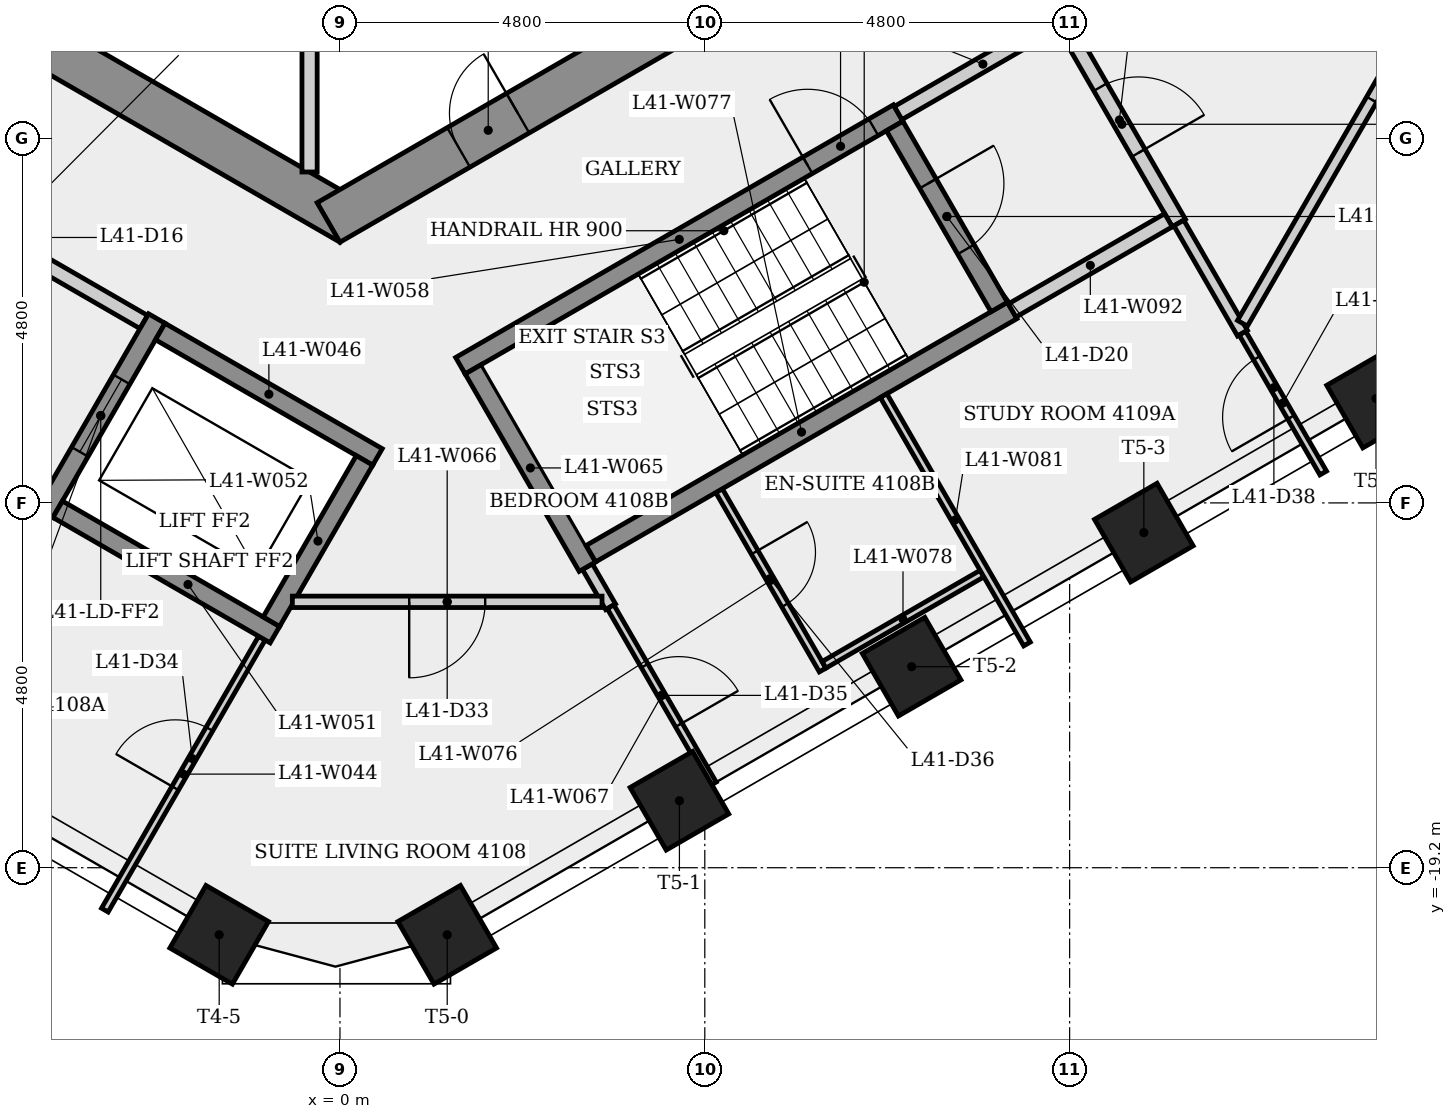
"""IFC4 building model, lengths in metres.
Left out: names, types, materials, properties, quantities, classifications, styles, units other than length and angle.
Written with IfcOpenShell. Run it as: python <this file> out.ifc"""

import sys

from ifc_helpers import new_model, si_unit, direction, frame, frame_2d, origin, origin_2d, place, context, subcontext, project, spatial, rectangle, extrude, element, fill, save


model = new_model("IFC4")
c1 = context("Model", 3, precision=1e-05, world=origin(), true_north=direction((0.0, 1.0)))
c2 = subcontext(c1, "Body", "Model", "MODEL_VIEW")
j1 = project(units=[si_unit("LENGTHUNIT", "METRE"), si_unit("PLANEANGLEUNIT", "RADIAN")], contexts=[c1])
p1 = place(None, origin())
s1 = spatial("IfcSite", under=j1, at=p1, CompositionType="ELEMENT")
p2 = place(p1, origin())
s2 = spatial("IfcBuilding", under=s1, at=p2, CompositionType="ELEMENT")
p3 = place(p2, frame((0.0, 0.0, 156.1)))
s3 = spatial("IfcBuildingStorey", under=s2, at=p3, CompositionType="ELEMENT", Elevation=156.1)
p4 = place(p3, frame((-9.35, -5.225, 0.0), z_axis=(0.0, 0.0, 1.0), x_axis=(0.866023993627, -0.500002442456, 0.0)))
e1 = element("IfcWall", 1, at=p4, inside=s3, PredefinedType="SHEAR", context=c2, shape_type="SweptSolid", body=[
    extrude(rectangle(XDim=10.97, YDim=0.6, at=frame_2d((5.485, 0.0))), origin(), (0.0, 0.0, 1.0), 3.4),
])
p5 = place(p4, frame((4.816, 0.0, 0.0)))
e2 = element("IfcOpeningElement", 2, at=p5, cuts=e1, PredefinedType="OPENING", context=c2, shape_type="SweptSolid", body=[
    extrude(rectangle(XDim=0.9, YDim=2.1, at=frame_2d((0.45, 1.05))), frame((0.0, 0.31, 0.0), z_axis=(0.0, -1.0, 0.0), x_axis=(1.0, 0.0, 0.0)), (0.0, 0.0, 1.0), 0.62),
])
p6 = place(p3, frame((-0.15, -10.71, 0.0), z_axis=(0.0, 0.0, 1.0), x_axis=(0.866023993627, 0.500002442456, 0.0)))
e3 = element("IfcWall", 3, at=p6, inside=s3, PredefinedType="SHEAR", context=c2, shape_type="SweptSolid", body=[
    extrude(rectangle(XDim=10.97, YDim=0.6, at=frame_2d((5.485, 0.0))), origin(), (0.0, 0.0, 1.0), 3.4),
])
p7 = place(p6, frame((1.975, 0.0, 0.0)))
e4 = element("IfcOpeningElement", 4, at=p7, cuts=e3, PredefinedType="OPENING", context=c2, shape_type="SweptSolid", body=[
    extrude(rectangle(XDim=0.9, YDim=2.1, at=frame_2d((0.45, 1.05))), frame((0.0, 0.31, 0.0), z_axis=(0.0, -1.0, 0.0), x_axis=(1.0, 0.0, 0.0)), (0.0, 0.0, 1.0), 0.62),
])
p8 = place(p6, frame((8.782, 0.0, 0.0)))
e5 = element("IfcOpeningElement", 5, at=p8, cuts=e3, PredefinedType="OPENING", context=c2, shape_type="SweptSolid", body=[
    extrude(rectangle(XDim=0.9, YDim=2.1, at=frame_2d((0.45, 1.05))), frame((0.0, 0.31, 0.0), z_axis=(0.0, -1.0, 0.0), x_axis=(1.0, 0.0, 0.0)), (0.0, 0.0, 1.0), 0.62),
])
for number, where, z_axis, x_axis in (
    (6, (-1.589, -20.083, 0.0), (0.0, 0.0, 1.0), (-0.5, -0.866, 0.0)),
    (7, (1.411, -20.083, 0.0), (0.0, 0.0, 1.0), (0.5, -0.866, 0.0)),
    (8, (4.466, -18.319, 0.0), (0.0, 0.0, 1.0), (0.5, -0.866, 0.0)),
    (9, (7.521, -16.555, 0.0), (0.0, 0.0, 1.0), (0.5, -0.866, 0.0)),
    (10, (10.576, -14.791, 0.0), (0.0, 0.0, 1.0), (0.5, -0.866, 0.0)),
    (11, (13.631, -13.027, 0.0), (0.0, 0.0, 1.0), (0.5, -0.866, 0.0)),
):
    element("IfcColumn", number, at=place(p3, frame(where, z_axis=z_axis, x_axis=x_axis)), inside=s3, PredefinedType="COLUMN", context=c2, shape_type="SweptSolid", body=[
        extrude(rectangle(XDim=0.95, YDim=0.95, at=origin_2d()), origin(), (0.0, 0.0, 1.0), 3.4),
    ])
p9 = place(p3, frame((-6.435, -9.795, 0.0), z_axis=(0.0, 0.0, 1.0), x_axis=(0.866012907634, -0.500021643343, 0.0)))
e12 = element("IfcWall", 12, at=p9, inside=s3, PredefinedType="PARTITIONING", context=c2, shape_type="SweptSolid", body=[
    extrude(rectangle(XDim=4.45, YDim=0.2, at=frame_2d((2.225, 0.0))), origin(), (0.0, 0.0, 1.0), 3.05),
])
p10 = place(p9, frame((1.675, 0.0, 0.0)))
e13 = element("IfcOpeningElement", 13, at=p10, cuts=e12, PredefinedType="OPENING", context=c2, shape_type="SweptSolid", body=[
    extrude(rectangle(XDim=1.1, YDim=2.1, at=frame_2d((0.55, 1.05))), frame((0.0, 0.11, 0.0), z_axis=(0.0, -1.0, 0.0), x_axis=(1.0, 0.0, 0.0)), (0.0, 0.0, 1.0), 0.22),
])
p11 = place(p3, frame((-3.094, -19.758, 0.0), z_axis=(0.0, 0.0, 1.0), x_axis=(0.500027577057, 0.866009481578, 0.0)))
e14 = element("IfcWall", 14, at=p11, inside=s3, PredefinedType="PARTITIONING", context=c2, shape_type="SweptSolid", body=[
    extrude(rectangle(XDim=4.133, YDim=0.1, at=frame_2d((2.066, 0.0))), origin(), (0.0, 0.0, 1.0), 3.05),
])
p12 = place(p11, frame((1.852, 0.0, 0.0)))
e15 = element("IfcOpeningElement", 15, at=p12, cuts=e14, PredefinedType="OPENING", context=c2, shape_type="SweptSolid", body=[
    extrude(rectangle(XDim=0.9, YDim=2.1, at=frame_2d((0.45, 1.05))), frame((0.0, 0.06, 0.0), z_axis=(0.0, -1.0, 0.0), x_axis=(1.0, 0.0, 0.0)), (0.0, 0.0, 1.0), 0.12),
])
p13 = place(p3, frame((-2.41, -11.974, 0.0), z_axis=(0.0, 0.0, 1.0), x_axis=(-0.500001826776, -0.866024349092, 0.0)))
e16 = element("IfcWall", 16, at=p13, inside=s3, PredefinedType="SHEAR", context=c2, shape_type="SweptSolid", body=[
    extrude(rectangle(XDim=2.95, YDim=0.25, at=frame_2d((1.475, 0.0))), origin(), (0.0, 0.0, 1.0), 3.05),
])
p14 = place(p13, frame((0.925, 0.0, 0.0)))
e17 = element("IfcOpeningElement", 17, at=p14, cuts=e16, PredefinedType="OPENING", context=c2, shape_type="SweptSolid", body=[
    extrude(rectangle(XDim=1.1, YDim=2.1, at=frame_2d((0.55, 1.05))), frame((0.0, 0.135, 0.0), z_axis=(0.0, -1.0, 0.0), x_axis=(1.0, 0.0, 0.0)), (0.0, 0.0, 1.0), 0.27),
])
p15 = place(p3, frame((-2.364, -12.145, 0.0), z_axis=(0.0, 0.0, 1.0), x_axis=(0.866040211805, -0.499974350878, 0.0)))
e18 = element("IfcWall", 18, at=p15, inside=s3, PredefinedType="SHEAR", context=c2, shape_type="SweptSolid", body=[
    extrude(rectangle(XDim=3.3, YDim=0.25, at=frame_2d((1.65, 0.0))), origin(), (0.0, 0.0, 1.0), 3.05),
])
p16 = place(p3, frame((-0.856, -16.133, 0.0), z_axis=(0.0, 0.0, 1.0), x_axis=(-0.866021716278, 0.500006386895, 0.0)))
e19 = element("IfcWall", 19, at=p16, inside=s3, PredefinedType="SHEAR", context=c2, shape_type="SweptSolid", body=[
    extrude(rectangle(XDim=3.3, YDim=0.25, at=frame_2d((1.65, 0.0))), origin(), (0.0, 0.0, 1.0), 3.05),
])
p17 = place(p3, frame((-0.902, -15.962, 0.0), z_axis=(0.0, 0.0, 1.0), x_axis=(0.500061746146, 0.865989751695, 0.0)))
e20 = element("IfcWall", 20, at=p17, inside=s3, PredefinedType="SHEAR", context=c2, shape_type="SweptSolid", body=[
    extrude(rectangle(XDim=2.45, YDim=0.25, at=frame_2d((1.225, 0.0))), origin(), (0.0, 0.0, 1.0), 3.4),
])
p18 = place(p3, frame((-0.4, -5.25, 0.0), z_axis=(0.0, 0.0, 1.0), x_axis=(0.0, -1.0, 0.0)))
e21 = element("IfcWall", 21, at=p18, inside=s3, PredefinedType="PARTITIONING", context=c2, shape_type="SweptSolid", body=[
    extrude(rectangle(XDim=4.796, YDim=0.2, at=frame_2d((2.398, 0.0))), origin(), (0.0, 0.0, 1.0), 3.05),
])
p19 = place(p3, frame((1.585, -12.595, 0.0), z_axis=(0.0, 0.0, 1.0), x_axis=(0.866036417653, 0.499980922934, 0.0)))
e22 = element("IfcWall", 22, at=p19, inside=s3, PredefinedType="SHEAR", context=c2, shape_type="SweptSolid", body=[
    extrude(rectangle(XDim=6.65, YDim=0.25, at=frame_2d((3.325, 0.0))), origin(), (0.0, 0.0, 1.0), 3.05),
])
p20 = place(p19, frame((5.275, 0.0, 0.0)))
e23 = element("IfcOpeningElement", 23, at=p20, cuts=e22, PredefinedType="OPENING", context=c2, shape_type="SweptSolid", body=[
    extrude(rectangle(XDim=1.0, YDim=2.1, at=frame_2d((0.5, 1.05))), frame((0.0, 0.135, 0.0), z_axis=(0.0, -1.0, 0.0), x_axis=(1.0, 0.0, 0.0)), (0.0, 0.0, 1.0), 0.27),
])
p21 = place(p3, frame((3.256, -15.239, 0.0), z_axis=(0.0, 0.0, 1.0), x_axis=(0.499930512259, -0.866065518833, 0.0)))
e24 = element("IfcWall", 24, at=p21, inside=s3, PredefinedType="PARTITIONING", context=c2, shape_type="SweptSolid", body=[
    extrude(rectangle(XDim=0.609, YDim=0.15, at=frame_2d((0.305, 0.0))), origin(), (0.0, 0.0, 1.0), 3.05),
])
p22 = place(p3, frame((3.256, -15.239, 0.0), z_axis=(0.0, 0.0, 1.0), x_axis=(-0.50002537861, 0.866010750942, 0.0)))
e25 = element("IfcWall", 25, at=p22, inside=s3, PredefinedType="SHEAR", context=c2, shape_type="SweptSolid", body=[
    extrude(rectangle(XDim=3.0, YDim=0.25, at=frame_2d((1.5, 0.0))), origin(), (0.0, 0.0, 1.0), 3.05),
])
p23 = place(p3, frame((3.448, -15.702, 0.0), z_axis=(0.0, 0.0, 1.0), x_axis=(-1.0, 0.0, 0.0)))
e26 = element("IfcWall", 26, at=p23, inside=s3, PredefinedType="PARTITIONING", context=c2, shape_type="SweptSolid", body=[
    extrude(rectangle(XDim=4.074, YDim=0.15, at=frame_2d((2.037, 0.0))), origin(), (0.0, 0.0, 1.0), 3.05),
])
p24 = place(p23, frame((1.537, 0.0, 0.0)))
e27 = element("IfcOpeningElement", 27, at=p24, cuts=e26, PredefinedType="OPENING", context=c2, shape_type="SweptSolid", body=[
    extrude(rectangle(XDim=1.0, YDim=2.1, at=frame_2d((0.5, 1.05))), frame((0.0, 0.085, 0.0), z_axis=(0.0, -1.0, 0.0), x_axis=(1.0, 0.0, 0.0)), (0.0, 0.0, 1.0), 0.17),
])
p25 = place(p3, frame((3.56, -15.767, 0.0), z_axis=(0.0, 0.0, 1.0), x_axis=(0.500010215181, -0.866019505967, 0.0)))
e28 = element("IfcWall", 28, at=p25, inside=s3, PredefinedType="PARTITIONING", context=c2, shape_type="SweptSolid", body=[
    extrude(rectangle(XDim=2.693, YDim=0.1, at=frame_2d((1.346, 0.0))), origin(), (0.0, 0.0, 1.0), 3.05),
])
p26 = place(p25, frame((0.896, 0.0, 0.0)))
e29 = element("IfcOpeningElement", 29, at=p26, cuts=e28, PredefinedType="OPENING", context=c2, shape_type="SweptSolid", body=[
    extrude(rectangle(XDim=0.9, YDim=2.1, at=frame_2d((0.45, 1.05))), frame((0.0, 0.06, 0.0), z_axis=(0.0, -1.0, 0.0), x_axis=(1.0, 0.0, 0.0)), (0.0, 0.0, 1.0), 0.12),
])
p27 = place(p3, frame((4.988, -14.239, 0.0), z_axis=(0.0, 0.0, 1.0), x_axis=(0.500022328685, -0.866012511928, 0.0)))
e30 = element("IfcWall", 30, at=p27, inside=s3, PredefinedType="PARTITIONING", context=c2, shape_type="SweptSolid", body=[
    extrude(rectangle(XDim=2.725, YDim=0.1, at=frame_2d((1.363, 0.0))), origin(), (0.0, 0.0, 1.0), 3.05),
])
p28 = place(p27, frame((0.938, 0.0, 0.0)))
e31 = element("IfcOpeningElement", 31, at=p28, cuts=e30, PredefinedType="OPENING", context=c2, shape_type="SweptSolid", body=[
    extrude(rectangle(XDim=0.8, YDim=2.1, at=frame_2d((0.4, 1.05))), frame((0.0, 0.06, 0.0), z_axis=(0.0, -1.0, 0.0), x_axis=(1.0, 0.0, 0.0)), (0.0, 0.0, 1.0), 0.12),
])
p29 = place(p3, frame((3.301, -15.068, 0.0), z_axis=(0.0, 0.0, 1.0), x_axis=(0.866035036182, 0.499983315828, 0.0)))
e32 = element("IfcWall", 32, at=p29, inside=s3, PredefinedType="SHEAR", context=c2, shape_type="SweptSolid", body=[
    extrude(rectangle(XDim=6.4, YDim=0.25, at=frame_2d((3.2, 0.0))), origin(), (0.0, 0.0, 1.0), 3.05),
])
p30 = place(p3, frame((6.368, -16.531, 0.0), z_axis=(0.0, 0.0, 1.0), x_axis=(0.866006032174, 0.500033551112, 0.0)))
e33 = element("IfcWall", 33, at=p30, inside=s3, PredefinedType="PARTITIONING", context=c2, shape_type="SweptSolid", body=[
    extrude(rectangle(XDim=2.4, YDim=0.1, at=frame_2d((1.2, 0.0))), origin(), (0.0, 0.0, 1.0), 3.05),
])
p31 = place(p3, frame((7.153, -12.989, 0.0), z_axis=(0.0, 0.0, 1.0), x_axis=(0.500008086624, -0.86602073492, 0.0)))
e34 = element("IfcWall", 34, at=p31, inside=s3, PredefinedType="PARTITIONING", context=c2, shape_type="SweptSolid", body=[
    extrude(rectangle(XDim=3.773, YDim=0.1, at=frame_2d((1.887, 0.0))), origin(), (0.0, 0.0, 1.0), 3.05),
])
p32 = place(p3, frame((7.298, -9.441, 0.0), z_axis=(0.0, 0.0, 1.0), x_axis=(0.500034990121, -0.866005201286, 0.0)))
e35 = element("IfcWall", 35, at=p32, inside=s3, PredefinedType="SHEAR", context=c2, shape_type="SweptSolid", body=[
    extrude(rectangle(XDim=2.75, YDim=0.25, at=frame_2d((1.375, 0.0))), origin(), (0.0, 0.0, 1.0), 3.05),
])
p33 = place(p32, frame((0.875, 0.0, 0.0)))
e36 = element("IfcOpeningElement", 36, at=p33, cuts=e35, PredefinedType="OPENING", context=c2, shape_type="SweptSolid", body=[
    extrude(rectangle(XDim=1.0, YDim=2.1, at=frame_2d((0.5, 1.05))), frame((0.0, 0.135, 0.0), z_axis=(0.0, -1.0, 0.0), x_axis=(1.0, 0.0, 0.0)), (0.0, 0.0, 1.0), 0.27),
])
p34 = place(p3, frame((7.344, -9.27, 0.0), z_axis=(0.0, 0.0, 1.0), x_axis=(0.866005588531, 0.500034319456, 0.0)))
e37 = element("IfcWall", 37, at=p34, inside=s3, PredefinedType="PARTITIONING", context=c2, shape_type="SweptSolid", body=[
    extrude(rectangle(XDim=2.575, YDim=0.2, at=frame_2d((1.288, 0.0))), origin(), (0.0, 0.0, 1.0), 3.05),
])
p35 = place(p3, frame((9.537, -8.119, 0.0), z_axis=(0.0, 0.0, 1.0), x_axis=(0.499990139034, -0.866031096941, 0.0)))
e38 = element("IfcWall", 38, at=p35, inside=s3, PredefinedType="PARTITIONING", context=c2, shape_type="SweptSolid", body=[
    extrude(rectangle(XDim=3.0, YDim=0.2, at=frame_2d((1.5, 0.0))), origin(), (0.0, 0.0, 1.0), 3.05),
])
p36 = place(p35, frame((0.935, 0.0, 0.0)))
e39 = element("IfcOpeningElement", 39, at=p36, cuts=e38, PredefinedType="OPENING", context=c2, shape_type="SweptSolid", body=[
    extrude(rectangle(XDim=1.0, YDim=2.1, at=frame_2d((0.5, 1.05))), frame((0.0, 0.11, 0.0), z_axis=(0.0, -1.0, 0.0), x_axis=(1.0, 0.0, 0.0)), (0.0, 0.0, 1.0), 0.22),
])
p37 = place(p3, frame((10.901, -10.681, 0.0), z_axis=(0.0, 0.0, 1.0), x_axis=(-0.866007538022, -0.500030943131, 0.0)))
e40 = element("IfcWall", 40, at=p37, inside=s3, PredefinedType="PARTITIONING", context=c2, shape_type="SweptSolid", body=[
    extrude(rectangle(XDim=2.375, YDim=0.2, at=frame_2d((1.188, 0.0))), origin(), (0.0, 0.0, 1.0), 3.05),
])
p38 = place(p3, frame((11.874, -12.167, 0.0), z_axis=(0.0, 0.0, 1.0), x_axis=(-0.499920289095, 0.866071420006, 0.0)))
e41 = element("IfcWall", 41, at=p38, inside=s3, PredefinedType="PARTITIONING", context=c2, shape_type="SweptSolid", body=[
    extrude(rectangle(XDim=1.674, YDim=0.15, at=frame_2d((0.837, 0.0))), origin(), (0.0, 0.0, 1.0), 3.05),
])
p39 = place(p3, frame((12.936, -14.007, 0.0), z_axis=(0.0, 0.0, 1.0), x_axis=(-0.499957859296, 0.866049732364, 0.0)))
e42 = element("IfcWall", 42, at=p39, inside=s3, PredefinedType="PARTITIONING", context=c2, shape_type="SweptSolid", body=[
    extrude(rectangle(XDim=2.125, YDim=0.1, at=frame_2d((1.062, 0.0))), origin(), (0.0, 0.0, 1.0), 3.05),
])
p40 = place(p39, frame((0.848, 0.0, 0.0)))
e43 = element("IfcOpeningElement", 43, at=p40, cuts=e42, PredefinedType="OPENING", context=c2, shape_type="SweptSolid", body=[
    extrude(rectangle(XDim=0.9, YDim=2.1, at=frame_2d((0.45, 1.05))), frame((0.0, 0.06, 0.0), z_axis=(0.0, -1.0, 0.0), x_axis=(1.0, 0.0, 0.0)), (0.0, 0.0, 1.0), 0.12),
])
p41 = place(p3, frame((15.772, -5.285, 0.0), z_axis=(0.0, 0.0, 1.0), x_axis=(-0.500018810599, -0.866014543207, 0.0)))
e44 = element("IfcWall", 44, at=p41, inside=s3, PredefinedType="PARTITIONING", context=c2, shape_type="SweptSolid", body=[
    extrude(rectangle(XDim=7.797, YDim=0.15, at=frame_2d((3.898, 0.0))), origin(), (0.0, 0.0, 1.0), 3.05),
])
p42 = place(p41, frame((3.398, 0.0, 0.0)))
e45 = element("IfcOpeningElement", 45, at=p42, cuts=e44, PredefinedType="OPENING", context=c2, shape_type="SweptSolid", body=[
    extrude(rectangle(XDim=1.0, YDim=2.1, at=frame_2d((0.5, 1.05))), frame((0.0, 0.085, 0.0), z_axis=(0.0, -1.0, 0.0), x_axis=(1.0, 0.0, 0.0)), (0.0, 0.0, 1.0), 0.17),
])
p43 = place(p14, origin())
e46 = element("IfcDoor", 46, at=p43, inside=s3, OperationType="SLIDING_TO_LEFT", PredefinedType="DOOR", context=c2, shape_type="SweptSolid", body=[
    extrude(rectangle(XDim=1.1, YDim=2.1, at=frame_2d((0.55, 1.05))), frame((0.0, 0.025, 0.0), z_axis=(0.0, -1.0, 0.0), x_axis=(1.0, 0.0, 0.0)), (0.0, 0.0, 1.0), 0.05),
])
fill(e17, e46)
p44 = place(p20, origin())
e47 = element("IfcDoor", 47, at=p44, inside=s3, OperationType="SINGLE_SWING_LEFT", PredefinedType="DOOR", context=c2, shape_type="SweptSolid", body=[
    extrude(rectangle(XDim=1.0, YDim=2.1, at=frame_2d((0.5, 1.05))), frame((0.0, 0.025, 0.0), z_axis=(0.0, -1.0, 0.0), x_axis=(1.0, 0.0, 0.0)), (0.0, 0.0, 1.0), 0.05),
])
fill(e23, e47)
p45 = place(p36, origin())
e48 = element("IfcDoor", 48, at=p45, inside=s3, OperationType="SINGLE_SWING_RIGHT", PredefinedType="DOOR", context=c2, shape_type="SweptSolid", body=[
    extrude(rectangle(XDim=1.0, YDim=2.1, at=frame_2d((0.5, 1.05))), frame((0.0, 0.025, 0.0), z_axis=(0.0, -1.0, 0.0), x_axis=(1.0, 0.0, 0.0)), (0.0, 0.0, 1.0), 0.05),
])
fill(e39, e48)
p46 = place(p33, origin())
e49 = element("IfcDoor", 49, at=p46, inside=s3, OperationType="SINGLE_SWING_LEFT", PredefinedType="DOOR", context=c2, shape_type="SweptSolid", body=[
    extrude(rectangle(XDim=1.0, YDim=2.1, at=frame_2d((0.5, 1.05))), frame((0.0, 0.025, 0.0), z_axis=(0.0, -1.0, 0.0), x_axis=(1.0, 0.0, 0.0)), (0.0, 0.0, 1.0), 0.05),
])
fill(e36, e49)
p47 = place(p24, origin())
e50 = element("IfcDoor", 50, at=p47, inside=s3, OperationType="SINGLE_SWING_RIGHT", PredefinedType="DOOR", context=c2, shape_type="SweptSolid", body=[
    extrude(rectangle(XDim=1.0, YDim=2.1, at=frame_2d((0.5, 1.05))), frame((0.0, 0.025, 0.0), z_axis=(0.0, -1.0, 0.0), x_axis=(1.0, 0.0, 0.0)), (0.0, 0.0, 1.0), 0.05),
])
fill(e27, e50)
p48 = place(p12, origin())
e51 = element("IfcDoor", 51, at=p48, inside=s3, OperationType="SINGLE_SWING_LEFT", PredefinedType="DOOR", context=c2, shape_type="SweptSolid", body=[
    extrude(rectangle(XDim=0.9, YDim=2.1, at=frame_2d((0.45, 1.05))), frame((0.0, 0.025, 0.0), z_axis=(0.0, -1.0, 0.0), x_axis=(1.0, 0.0, 0.0)), (0.0, 0.0, 1.0), 0.05),
])
fill(e15, e51)
p49 = place(p26, origin())
e52 = element("IfcDoor", 52, at=p49, inside=s3, OperationType="SINGLE_SWING_RIGHT", PredefinedType="DOOR", context=c2, shape_type="SweptSolid", body=[
    extrude(rectangle(XDim=0.9, YDim=2.1, at=frame_2d((0.45, 1.05))), frame((0.0, 0.025, 0.0), z_axis=(0.0, -1.0, 0.0), x_axis=(1.0, 0.0, 0.0)), (0.0, 0.0, 1.0), 0.05),
])
fill(e29, e52)
p50 = place(p28, origin())
e53 = element("IfcDoor", 53, at=p50, inside=s3, OperationType="SINGLE_SWING_LEFT", PredefinedType="DOOR", context=c2, shape_type="SweptSolid", body=[
    extrude(rectangle(XDim=0.8, YDim=2.1, at=frame_2d((0.4, 1.05))), frame((0.0, 0.025, 0.0), z_axis=(0.0, -1.0, 0.0), x_axis=(1.0, 0.0, 0.0)), (0.0, 0.0, 1.0), 0.05),
])
fill(e31, e53)
p51 = place(p42, origin())
e54 = element("IfcDoor", 54, at=p51, inside=s3, OperationType="SINGLE_SWING_RIGHT", PredefinedType="DOOR", context=c2, shape_type="SweptSolid", body=[
    extrude(rectangle(XDim=1.0, YDim=2.1, at=frame_2d((0.5, 1.05))), frame((0.0, 0.025, 0.0), z_axis=(0.0, -1.0, 0.0), x_axis=(1.0, 0.0, 0.0)), (0.0, 0.0, 1.0), 0.05),
])
fill(e45, e54)
p52 = place(p40, origin())
e55 = element("IfcDoor", 55, at=p52, inside=s3, OperationType="SINGLE_SWING_LEFT", PredefinedType="DOOR", context=c2, shape_type="SweptSolid", body=[
    extrude(rectangle(XDim=0.9, YDim=2.1, at=frame_2d((0.45, 1.05))), frame((0.0, 0.025, 0.0), z_axis=(0.0, -1.0, 0.0), x_axis=(1.0, 0.0, 0.0)), (0.0, 0.0, 1.0), 0.05),
])
fill(e43, e55)
p53 = place(p7, origin())
e56 = element("IfcDoor", 56, at=p53, inside=s3, OperationType="SINGLE_SWING_RIGHT", PredefinedType="DOOR", context=c2, shape_type="SweptSolid", body=[
    extrude(rectangle(XDim=0.9, YDim=2.1, at=frame_2d((0.45, 1.05))), frame((0.0, 0.025, 0.0), z_axis=(0.0, -1.0, 0.0), x_axis=(1.0, 0.0, 0.0)), (0.0, 0.0, 1.0), 0.05),
])
fill(e4, e56)
save(model, sys.argv[1])
